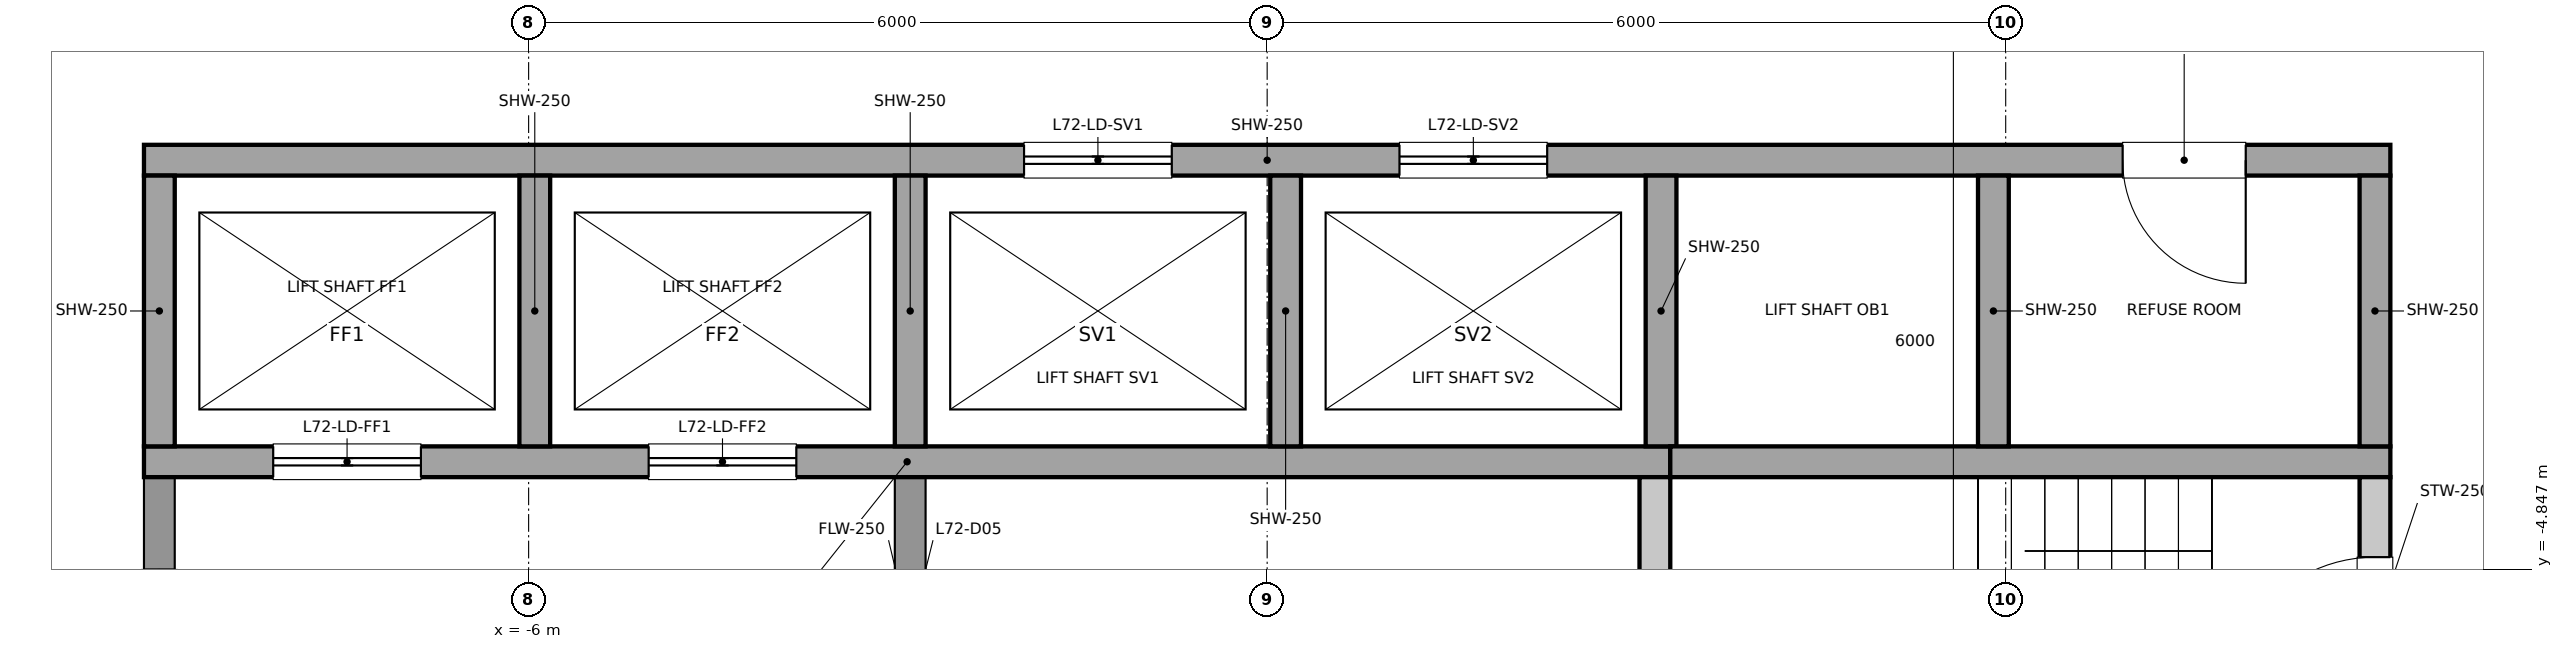
"""IFC4 building model, lengths in metres.
Left out: names, types, materials, properties, quantities, classifications, styles, units other than length and angle.
Written with IfcOpenShell. Run it as: python <this file> out.ifc"""

import sys

from ifc_helpers import new_model, si_unit, direction, frame, frame_2d, origin, place, context, subcontext, project, spatial, rectangle, extrude, element, fill, save


model = new_model("IFC4")
c1 = context("Model", 3, precision=1e-05, world=origin(), true_north=direction((0.0, 1.0)))
c2 = subcontext(c1, "Body", "Model", "MODEL_VIEW")
j1 = project(units=[si_unit("LENGTHUNIT", "METRE"), si_unit("PLANEANGLEUNIT", "RADIAN")], contexts=[c1])
p1 = place(None, origin())
s1 = spatial("IfcSite", under=j1, at=p1, CompositionType="ELEMENT")
p2 = place(p1, origin())
s2 = spatial("IfcBuilding", under=s1, at=p2, CompositionType="ELEMENT")
p3 = place(p2, frame((0.0, 0.0, 324.4)))
s3 = spatial("IfcBuildingStorey", under=s2, at=p3, CompositionType="ELEMENT", Elevation=324.4)
p4 = place(p3, frame((9.0, -6.6, 0.0), z_axis=(0.0, 0.0, 1.0), x_axis=(0.0, 1.0, 0.0)))
e1 = element("IfcWall", 1, at=p4, inside=s3, PredefinedType="SOLIDWALL", context=c2, shape_type="SweptSolid", body=[
    extrude(rectangle(XDim=2.5, YDim=0.25, at=frame_2d((1.25, 0.0))), origin(), (0.0, 0.0, 1.0), 5.2),
])
p5 = place(p4, frame((0.65, 0.0, 0.0)))
e2 = element("IfcOpeningElement", 2, at=p5, cuts=e1, PredefinedType="OPENING", context=c2, shape_type="SweptSolid", body=[
    extrude(rectangle(XDim=1.2, YDim=2.1, at=frame_2d((0.6, 1.05))), frame((0.0, 0.125, 0.0), z_axis=(0.0, -1.0, 0.0), x_axis=(1.0, 0.0, 0.0)), (0.0, 0.0, 1.0), 0.25),
])
p6 = place(p3, frame((-9.0, -6.6, 0.0), z_axis=(0.0, 0.0, 1.0), x_axis=(0.0, 1.0, 0.0)))
e3 = element("IfcWall", 3, at=p6, inside=s3, PredefinedType="PARTITIONING", context=c2, shape_type="SweptSolid", body=[
    extrude(rectangle(XDim=2.5, YDim=0.25, at=frame_2d((1.25, 0.0))), origin(), (0.0, 0.0, 1.0), 5.2),
])
p7 = place(p6, frame((0.75, 0.0, 0.0)))
e4 = element("IfcOpeningElement", 4, at=p7, cuts=e3, PredefinedType="OPENING", context=c2, shape_type="SweptSolid", body=[
    extrude(rectangle(XDim=1.0, YDim=2.1, at=frame_2d((0.5, 1.05))), frame((0.0, 0.125, 0.0), z_axis=(0.0, -1.0, 0.0), x_axis=(1.0, 0.0, 0.0)), (0.0, 0.0, 1.0), 0.25),
])
p8 = place(p3, frame((3.15, -6.6, 0.0), z_axis=(0.0, 0.0, 1.0), x_axis=(0.0, 1.0, 0.0)))
e5 = element("IfcWall", 5, at=p8, inside=s3, PredefinedType="SOLIDWALL", context=c2, shape_type="SweptSolid", body=[
    extrude(rectangle(XDim=2.5, YDim=0.25, at=frame_2d((1.25, 0.0))), origin(), (0.0, 0.0, 1.0), 5.2),
])
p9 = place(p3, frame((-2.9, -6.6, 0.0), z_axis=(0.0, 0.0, 1.0), x_axis=(0.0, 1.0, 0.0)))
e6 = element("IfcWall", 6, at=p9, inside=s3, PredefinedType="PARTITIONING", context=c2, shape_type="SweptSolid", body=[
    extrude(rectangle(XDim=2.5, YDim=0.25, at=frame_2d((1.25, 0.0))), origin(), (0.0, 0.0, 1.0), 5.2),
])
p10 = place(p9, frame((0.8, 0.0, 0.0)))
e7 = element("IfcOpeningElement", 7, at=p10, cuts=e6, PredefinedType="OPENING", context=c2, shape_type="SweptSolid", body=[
    extrude(rectangle(XDim=0.9, YDim=2.1, at=frame_2d((0.45, 1.05))), frame((0.0, 0.125, 0.0), z_axis=(0.0, -1.0, 0.0), x_axis=(1.0, 0.0, 0.0)), (0.0, 0.0, 1.0), 0.25),
])
p11 = place(p3, frame((-9.125, -1.525, 0.0), z_axis=(0.0, 0.0, 1.0), x_axis=(1.0, 0.0, 0.0)))
e8 = element("IfcWall", 8, at=p11, inside=s3, PredefinedType="SOLIDWALL", context=c2, shape_type="SweptSolid", body=[
    extrude(rectangle(XDim=18.25, YDim=0.25, at=frame_2d((9.125, 0.0))), origin(), (0.0, 0.0, 1.0), 5.2),
])
p12 = place(p11, frame((7.15, 0.0, 0.0)))
e9 = element("IfcOpeningElement", 9, at=p12, cuts=e8, PredefinedType="OPENING", context=c2, shape_type="SweptSolid", body=[
    extrude(rectangle(XDim=1.2, YDim=2.1, at=frame_2d((0.6, 1.05))), frame((0.0, 0.125, 0.0), z_axis=(0.0, -1.0, 0.0), x_axis=(1.0, 0.0, 0.0)), (0.0, 0.0, 1.0), 0.25),
])
p13 = place(p11, frame((10.2, 0.0, 0.0)))
e10 = element("IfcOpeningElement", 10, at=p13, cuts=e8, PredefinedType="OPENING", context=c2, shape_type="SweptSolid", body=[
    extrude(rectangle(XDim=1.2, YDim=2.1, at=frame_2d((0.6, 1.05))), frame((0.0, 0.125, 0.0), z_axis=(0.0, -1.0, 0.0), x_axis=(1.0, 0.0, 0.0)), (0.0, 0.0, 1.0), 0.25),
])
p14 = place(p11, frame((16.075, 0.0, 0.0)))
e11 = element("IfcOpeningElement", 11, at=p14, cuts=e8, PredefinedType="OPENING", context=c2, shape_type="SweptSolid", body=[
    extrude(rectangle(XDim=1.0, YDim=2.1, at=frame_2d((0.5, 1.05))), frame((0.0, 0.125, 0.0), z_axis=(0.0, -1.0, 0.0), x_axis=(1.0, 0.0, 0.0)), (0.0, 0.0, 1.0), 0.25),
])
p15 = place(p3, frame((-9.125, -3.975, 0.0), z_axis=(0.0, 0.0, 1.0), x_axis=(1.0, 0.0, 0.0)))
e12 = element("IfcWall", 12, at=p15, inside=s3, PredefinedType="SOLIDWALL", context=c2, shape_type="SweptSolid", body=[
    extrude(rectangle(XDim=12.4, YDim=0.25, at=frame_2d((6.2, 0.0))), origin(), (0.0, 0.0, 1.0), 5.2),
])
p16 = place(p15, frame((1.05, 0.0, 0.0)))
e13 = element("IfcOpeningElement", 13, at=p16, cuts=e12, PredefinedType="OPENING", context=c2, shape_type="SweptSolid", body=[
    extrude(rectangle(XDim=1.2, YDim=2.1, at=frame_2d((0.6, 1.05))), frame((0.0, 0.125, 0.0), z_axis=(0.0, -1.0, 0.0), x_axis=(1.0, 0.0, 0.0)), (0.0, 0.0, 1.0), 0.25),
])
p17 = place(p15, frame((4.1, 0.0, 0.0)))
e14 = element("IfcOpeningElement", 14, at=p17, cuts=e12, PredefinedType="OPENING", context=c2, shape_type="SweptSolid", body=[
    extrude(rectangle(XDim=1.2, YDim=2.1, at=frame_2d((0.6, 1.05))), frame((0.0, 0.125, 0.0), z_axis=(0.0, -1.0, 0.0), x_axis=(1.0, 0.0, 0.0)), (0.0, 0.0, 1.0), 0.25),
])
p18 = place(p3, frame((3.275, -3.975, 0.0), z_axis=(0.0, 0.0, 1.0), x_axis=(1.0, 0.0, 0.0)))
e15 = element("IfcWall", 15, at=p18, inside=s3, PredefinedType="SOLIDWALL", context=c2, shape_type="SweptSolid", body=[
    extrude(rectangle(XDim=5.85, YDim=0.25, at=frame_2d((2.925, 0.0))), origin(), (0.0, 0.0, 1.0), 5.2),
])
for number, where, z_axis, x_axis in (
    (16, (-9.0, -3.85, 0.0), (0.0, 0.0, 1.0), (0.0, 1.0, 0.0)),
    (17, (-5.95, -3.85, 0.0), (0.0, 0.0, 1.0), (0.0, 1.0, 0.0)),
    (18, (-2.9, -3.85, 0.0), (0.0, 0.0, 1.0), (0.0, 1.0, 0.0)),
    (19, (0.15, -3.85, 0.0), (0.0, 0.0, 1.0), (0.0, 1.0, 0.0)),
    (20, (3.2, -3.85, 0.0), (0.0, 0.0, 1.0), (0.0, 1.0, 0.0)),
    (21, (5.9, -3.85, 0.0), (0.0, 0.0, 1.0), (0.0, 1.0, 0.0)),
    (22, (9.0, -3.85, 0.0), (0.0, 0.0, 1.0), (0.0, 1.0, 0.0)),
):
    element("IfcWall", number, at=place(p3, frame(where, z_axis=z_axis, x_axis=x_axis)), inside=s3, PredefinedType="SOLIDWALL", context=c2, shape_type="SweptSolid", body=[
        extrude(rectangle(XDim=2.2, YDim=0.25, at=frame_2d((1.1, 0.0))), origin(), (0.0, 0.0, 1.0), 5.2),
    ])
p19 = place(p16, origin())
e23 = element("IfcDoor", 23, at=p19, inside=s3, OperationType="DOUBLE_DOOR_SLIDING", PredefinedType="DOOR", context=c2, shape_type="SweptSolid", body=[
    extrude(rectangle(XDim=1.2, YDim=2.1, at=frame_2d((0.6, 1.05))), frame((0.0, 0.025, 0.0), z_axis=(0.0, -1.0, 0.0), x_axis=(1.0, 0.0, 0.0)), (0.0, 0.0, 1.0), 0.05),
])
fill(e13, e23)
p20 = place(p17, origin())
e24 = element("IfcDoor", 24, at=p20, inside=s3, OperationType="DOUBLE_DOOR_SLIDING", PredefinedType="DOOR", context=c2, shape_type="SweptSolid", body=[
    extrude(rectangle(XDim=1.2, YDim=2.1, at=frame_2d((0.6, 1.05))), frame((0.0, 0.025, 0.0), z_axis=(0.0, -1.0, 0.0), x_axis=(1.0, 0.0, 0.0)), (0.0, 0.0, 1.0), 0.05),
])
fill(e14, e24)
p21 = place(p12, origin())
e25 = element("IfcDoor", 25, at=p21, inside=s3, OperationType="DOUBLE_DOOR_SLIDING", PredefinedType="DOOR", context=c2, shape_type="SweptSolid", body=[
    extrude(rectangle(XDim=1.2, YDim=2.1, at=frame_2d((0.6, 1.05))), frame((0.0, 0.025, 0.0), z_axis=(0.0, -1.0, 0.0), x_axis=(1.0, 0.0, 0.0)), (0.0, 0.0, 1.0), 0.05),
])
fill(e9, e25)
p22 = place(p13, origin())
e26 = element("IfcDoor", 26, at=p22, inside=s3, OperationType="DOUBLE_DOOR_SLIDING", PredefinedType="DOOR", context=c2, shape_type="SweptSolid", body=[
    extrude(rectangle(XDim=1.2, YDim=2.1, at=frame_2d((0.6, 1.05))), frame((0.0, 0.025, 0.0), z_axis=(0.0, -1.0, 0.0), x_axis=(1.0, 0.0, 0.0)), (0.0, 0.0, 1.0), 0.05),
])
fill(e10, e26)
p23 = place(p5, origin())
e27 = element("IfcDoor", 27, at=p23, inside=s3, OperationType="SINGLE_SWING_LEFT", PredefinedType="DOOR", context=c2, shape_type="SweptSolid", body=[
    extrude(rectangle(XDim=1.2, YDim=2.1, at=frame_2d((0.6, 1.05))), frame((0.0, 0.025, 0.0), z_axis=(0.0, -1.0, 0.0), x_axis=(1.0, 0.0, 0.0)), (0.0, 0.0, 1.0), 0.05),
])
fill(e2, e27)
p24 = place(p14, origin())
e28 = element("IfcDoor", 28, at=p24, inside=s3, OperationType="SINGLE_SWING_RIGHT", PredefinedType="DOOR", context=c2, shape_type="SweptSolid", body=[
    extrude(rectangle(XDim=1.0, YDim=2.1, at=frame_2d((0.5, 1.05))), frame((0.0, 0.025, 0.0), z_axis=(0.0, -1.0, 0.0), x_axis=(1.0, 0.0, 0.0)), (0.0, 0.0, 1.0), 0.05),
])
fill(e11, e28)
save(model, sys.argv[1])
